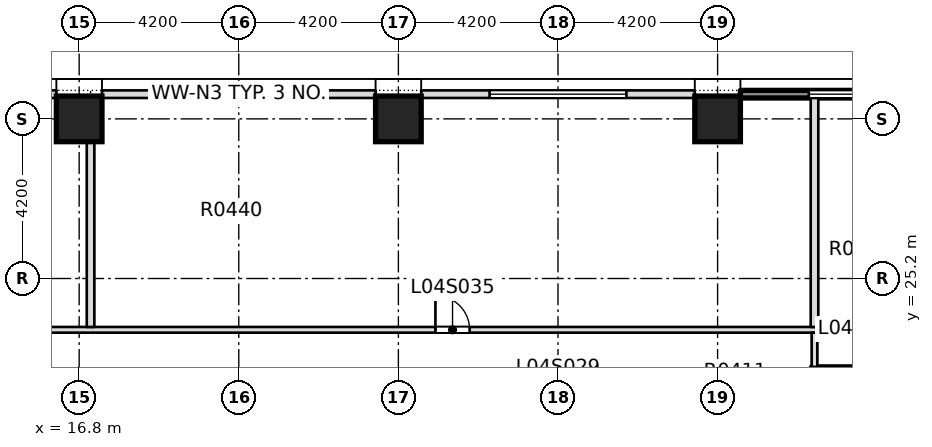
"""IFC4 building model, lengths in metres.
Left out: names, types, materials, properties, quantities, classifications, styles, units other than length and angle.
Written with IfcOpenShell. Run it as: python <this file> out.ifc"""

import sys

from ifc_helpers import new_model, si_unit, direction, frame, frame_2d, origin, origin_2d, place, context, subcontext, project, spatial, rectangle, extrude, element, fill, save


model = new_model("IFC4")
c1 = context("Model", 3, precision=1e-05, world=origin(), true_north=direction((0.0, 1.0)))
c2 = subcontext(c1, "Body", "Model", "MODEL_VIEW")
j1 = project(units=[si_unit("LENGTHUNIT", "METRE"), si_unit("PLANEANGLEUNIT", "RADIAN")], contexts=[c1])
p1 = place(None, origin())
s1 = spatial("IfcSite", under=j1, at=p1, CompositionType="ELEMENT")
p2 = place(p1, origin())
s2 = spatial("IfcBuilding", under=s1, at=p2, CompositionType="ELEMENT")
p3 = place(p2, frame((0.0, 0.0, 25.0)))
s3 = spatial("IfcBuildingStorey", under=s2, at=p3, CompositionType="ELEMENT", Elevation=25.0)
for number, where, z_axis, x_axis in (
    (1, (16.8, 29.4, 0.0), (0.0, 0.0, 1.0), (1.0, 0.0, 0.0)),
    (2, (25.2, 29.4, 0.0), (0.0, 0.0, 1.0), (1.0, 0.0, 0.0)),
    (3, (33.6, 29.4, 0.0), (0.0, 0.0, 1.0), (1.0, 0.0, 0.0)),
):
    element("IfcColumn", number, at=place(p3, frame(where, z_axis=z_axis, x_axis=x_axis)), inside=s3, PredefinedType="COLUMN", context=c2, shape_type="SweptSolid", body=[
        extrude(rectangle(XDim=1.2, YDim=1.2, at=origin_2d()), origin(), (0.0, 0.0, 1.0), 5.0),
    ])
p4 = place(p3, frame((36.075, 22.775, 0.0), z_axis=(0.0, 0.0, 1.0), x_axis=(1.0, 0.0, 0.0)))
e4 = element("IfcWall", 4, at=p4, inside=s3, PredefinedType="SOLIDWALL", context=c2, shape_type="SweptSolid", body=[
    extrude(rectangle(XDim=6.475, YDim=0.2, at=frame_2d((3.238, 0.0))), origin(), (0.0, 0.0, 1.0), 4.6),
])
p5 = place(p4, frame((0.675, 0.0, 0.0)))
e5 = element("IfcOpeningElement", 5, at=p5, cuts=e4, PredefinedType="OPENING", context=c2, shape_type="SweptSolid", body=[
    extrude(rectangle(XDim=1.2, YDim=2.1, at=frame_2d((0.6, 1.05))), frame((0.0, 0.11, 0.0), z_axis=(0.0, -1.0, 0.0), x_axis=(1.0, 0.0, 0.0)), (0.0, 0.0, 1.0), 0.22),
])
p6 = place(p3, frame((8.65, 23.85, 0.0), z_axis=(0.0, 0.0, 1.0), x_axis=(1.0, 0.0, 0.0)))
e6 = element("IfcWall", 6, at=p6, inside=s3, PredefinedType="PARTITIONING", context=c2, shape_type="SweptSolid", body=[
    extrude(rectangle(XDim=27.6, YDim=0.15, at=frame_2d((13.8, 0.0))), origin(), (0.0, 0.0, 1.0), 4.6),
])
p7 = place(p6, frame((3.8, 0.0, 0.0)))
e7 = element("IfcOpeningElement", 7, at=p7, cuts=e6, PredefinedType="OPENING", context=c2, shape_type="SweptSolid", body=[
    extrude(rectangle(XDim=0.9, YDim=2.1, at=frame_2d((0.45, 1.05))), frame((0.0, 0.085, 0.0), z_axis=(0.0, -1.0, 0.0), x_axis=(1.0, 0.0, 0.0)), (0.0, 0.0, 1.0), 0.17),
])
p8 = place(p6, frame((17.525, 0.0, 0.0)))
e8 = element("IfcOpeningElement", 8, at=p8, cuts=e6, PredefinedType="OPENING", context=c2, shape_type="SweptSolid", body=[
    extrude(rectangle(XDim=0.9, YDim=2.1, at=frame_2d((0.45, 1.05))), frame((0.0, 0.085, 0.0), z_axis=(0.0, -1.0, 0.0), x_axis=(1.0, 0.0, 0.0)), (0.0, 0.0, 1.0), 0.17),
])
p9 = place(p3, frame((17.1, 23.925, 0.0), z_axis=(0.0, 0.0, 1.0), x_axis=(0.0, 1.0, 0.0)))
e9 = element("IfcWall", 9, at=p9, inside=s3, PredefinedType="PARTITIONING", context=c2, shape_type="SweptSolid", body=[
    extrude(rectangle(XDim=6.025, YDim=0.2, at=frame_2d((3.012, 0.0))), origin(), (0.0, 0.0, 1.0), 4.6),
])
p10 = place(p3, frame((36.15, 22.875, 0.0), z_axis=(0.0, 0.0, 1.0), x_axis=(0.0, 1.0, 0.0)))
e10 = element("IfcWall", 10, at=p10, inside=s3, PredefinedType="PARTITIONING", context=c2, shape_type="SweptSolid", body=[
    extrude(rectangle(XDim=0.9, YDim=0.15, at=frame_2d((0.45, 0.0))), origin(), (0.0, 0.0, 1.0), 4.6),
])
p11 = place(p3, frame((36.15, 23.925, 0.0), z_axis=(0.0, 0.0, 1.0), x_axis=(0.0, 1.0, 0.0)))
e11 = element("IfcWall", 11, at=p11, inside=s3, PredefinedType="PARTITIONING", context=c2, shape_type="SweptSolid", body=[
    extrude(rectangle(XDim=6.025, YDim=0.2, at=frame_2d((3.012, 0.0))), origin(), (0.0, 0.0, 1.0), 4.6),
])
p12 = place(p3, frame((34.2, 30.05, 0.0), z_axis=(0.0, 0.0, 1.0), x_axis=(1.0, 0.0, 0.0)))
e12 = element("IfcWall", 12, at=p12, inside=s3, PredefinedType="SOLIDWALL", context=c2, shape_type="SweptSolid", body=[
    extrude(rectangle(XDim=7.2, YDim=0.2, at=frame_2d((3.6, 0.0))), origin(), (0.0, 0.0, 1.0), 4.6),
])
p13 = place(p12, frame((1.8, 0.0, 0.9)))
e13 = element("IfcOpeningElement", 13, at=p13, cuts=e12, PredefinedType="OPENING", context=c2, shape_type="SweptSolid", body=[
    extrude(rectangle(XDim=3.6, YDim=2.8, at=frame_2d((1.8, 1.4))), frame((0.0, 0.11, 0.0), z_axis=(0.0, -1.0, 0.0), x_axis=(1.0, 0.0, 0.0)), (0.0, 0.0, 1.0), 0.22),
])
p14 = place(p3, frame((33.0, 30.05, 0.0), z_axis=(0.0, 0.0, 1.0), x_axis=(-1.0, 0.0, 0.0)))
e14 = element("IfcWall", 14, at=p14, inside=s3, PredefinedType="STANDARD", context=c2, shape_type="SweptSolid", body=[
    extrude(rectangle(XDim=7.2, YDim=0.2, at=frame_2d((3.6, 0.0))), origin(), (0.0, 0.0, 1.0), 4.6),
])
p15 = place(p14, frame((1.8, 0.0, 0.9)))
e15 = element("IfcOpeningElement", 15, at=p15, cuts=e14, PredefinedType="OPENING", context=c2, shape_type="SweptSolid", body=[
    extrude(rectangle(XDim=3.6, YDim=2.8, at=frame_2d((1.8, 1.4))), frame((0.0, 0.11, 0.0), z_axis=(0.0, -1.0, 0.0), x_axis=(1.0, 0.0, 0.0)), (0.0, 0.0, 1.0), 0.22),
])
p16 = place(p3, frame((24.6, 30.05, 0.0), z_axis=(0.0, 0.0, 1.0), x_axis=(-1.0, 0.0, 0.0)))
e16 = element("IfcWall", 16, at=p16, inside=s3, PredefinedType="STANDARD", context=c2, shape_type="SweptSolid", body=[
    extrude(rectangle(XDim=7.2, YDim=0.2, at=frame_2d((3.6, 0.0))), origin(), (0.0, 0.0, 1.0), 4.6),
])
p17 = place(p16, frame((1.8, 0.0, 0.9)))
e17 = element("IfcOpeningElement", 17, at=p17, cuts=e16, PredefinedType="OPENING", context=c2, shape_type="SweptSolid", body=[
    extrude(rectangle(XDim=3.6, YDim=2.8, at=frame_2d((1.8, 1.4))), frame((0.0, 0.11, 0.0), z_axis=(0.0, -1.0, 0.0), x_axis=(1.0, 0.0, 0.0)), (0.0, 0.0, 1.0), 0.22),
])
p18 = place(p3, frame((16.2, 30.05, 0.0), z_axis=(0.0, 0.0, 1.0), x_axis=(-1.0, 0.0, 0.0)))
e18 = element("IfcWall", 18, at=p18, inside=s3, PredefinedType="STANDARD", context=c2, shape_type="SweptSolid", body=[
    extrude(rectangle(XDim=7.2, YDim=0.2, at=frame_2d((3.6, 0.0))), origin(), (0.0, 0.0, 1.0), 4.6),
])
p19 = place(p18, frame((1.8, 0.0, 0.9)))
e19 = element("IfcOpeningElement", 19, at=p19, cuts=e18, PredefinedType="OPENING", context=c2, shape_type="SweptSolid", body=[
    extrude(rectangle(XDim=3.6, YDim=2.8, at=frame_2d((1.8, 1.4))), frame((0.0, 0.11, 0.0), z_axis=(0.0, -1.0, 0.0), x_axis=(1.0, 0.0, 0.0)), (0.0, 0.0, 1.0), 0.22),
])
p20 = place(p8, origin())
e20 = element("IfcDoor", 20, at=p20, inside=s3, OperationType="SINGLE_SWING_RIGHT", PredefinedType="DOOR", context=c2, shape_type="SweptSolid", body=[
    extrude(rectangle(XDim=0.9, YDim=2.1, at=frame_2d((0.45, 1.05))), frame((0.0, 0.025, 0.0), z_axis=(0.0, -1.0, 0.0), x_axis=(1.0, 0.0, 0.0)), (0.0, 0.0, 1.0), 0.05),
])
fill(e8, e20)
p21 = place(p13, origin())
e21 = element("IfcWindow", 21, at=p21, inside=s3, PartitioningType="SINGLE_PANEL", PredefinedType="WINDOW", context=c2, shape_type="SweptSolid", body=[
    extrude(rectangle(XDim=3.6, YDim=2.8, at=frame_2d((1.8, 1.4))), frame((0.0, 0.03, 0.0), z_axis=(0.0, -1.0, 0.0), x_axis=(1.0, 0.0, 0.0)), (0.0, 0.0, 1.0), 0.06),
])
fill(e13, e21)
p22 = place(p15, origin())
e22 = element("IfcWindow", 22, at=p22, inside=s3, PartitioningType="SINGLE_PANEL", PredefinedType="WINDOW", context=c2, shape_type="SweptSolid", body=[
    extrude(rectangle(XDim=3.6, YDim=2.8, at=frame_2d((1.8, 1.4))), frame((0.0, 0.03, 0.0), z_axis=(0.0, -1.0, 0.0), x_axis=(1.0, 0.0, 0.0)), (0.0, 0.0, 1.0), 0.06),
])
fill(e15, e22)
p23 = place(p17, origin())
e23 = element("IfcWindow", 23, at=p23, inside=s3, PartitioningType="SINGLE_PANEL", PredefinedType="WINDOW", context=c2, shape_type="SweptSolid", body=[
    extrude(rectangle(XDim=3.6, YDim=2.8, at=frame_2d((1.8, 1.4))), frame((0.0, 0.03, 0.0), z_axis=(0.0, -1.0, 0.0), x_axis=(1.0, 0.0, 0.0)), (0.0, 0.0, 1.0), 0.06),
])
fill(e17, e23)
save(model, sys.argv[1])
